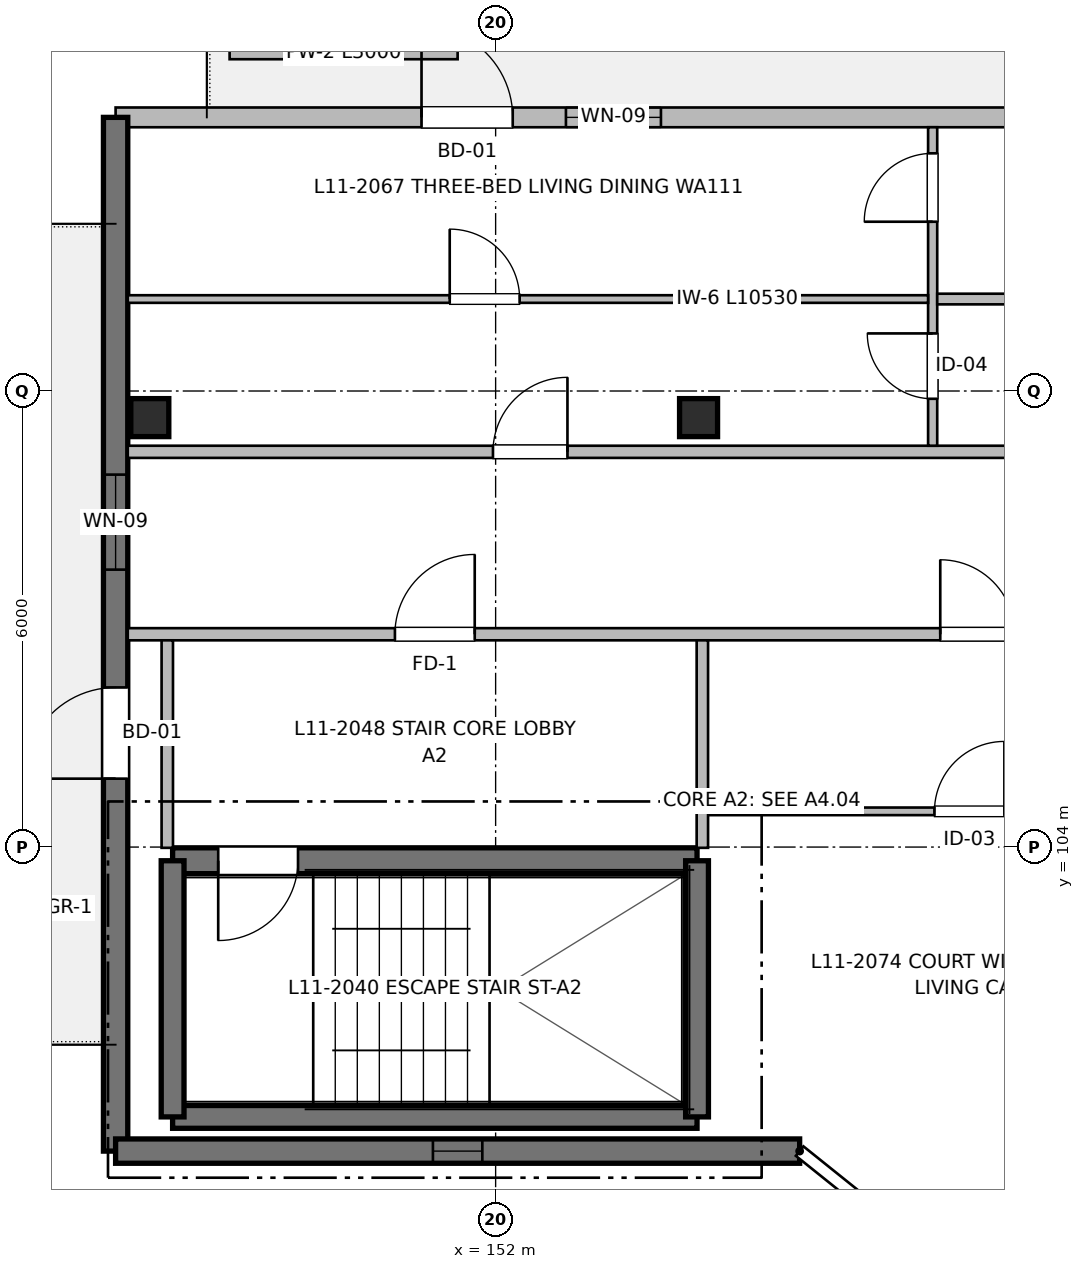
"""IFC4 building model, lengths in metres.
Left out: names, types, materials, properties, quantities, classifications, styles, units other than length and angle.
Written with IfcOpenShell. Run it as: python <this file> out.ifc"""

import sys

from ifc_helpers import new_model, si_unit, direction, frame, frame_2d, origin, origin_2d, place, context, subcontext, project, spatial, rectangle, extrude, element, fill, save


model = new_model("IFC4")
c1 = context("Model", 3, precision=1e-05, world=origin(), true_north=direction((0.0, 1.0)))
c2 = subcontext(c1, "Body", "Model", "MODEL_VIEW")
j1 = project(units=[si_unit("LENGTHUNIT", "METRE"), si_unit("PLANEANGLEUNIT", "RADIAN")], contexts=[c1])
p1 = place(None, origin())
s1 = spatial("IfcSite", under=j1, at=p1, CompositionType="ELEMENT")
p2 = place(p1, origin())
s2 = spatial("IfcBuilding", under=s1, at=p2, CompositionType="ELEMENT")
p3 = place(p2, frame((0.0, 0.0, 36.16)))
s3 = spatial("IfcBuildingStorey", under=s2, at=p3, CompositionType="ELEMENT", Elevation=36.16)
for number, where, z_axis, x_axis in (
    (1, (147.45, 109.65, 0.0), (0.0, 0.0, 1.0), (1.0, 0.0, 0.0)),
    (2, (154.67, 109.65, 0.0), (0.0, 0.0, 1.0), (1.0, 0.0, 0.0)),
):
    element("IfcColumn", number, at=place(p3, frame(where, z_axis=z_axis, x_axis=x_axis)), inside=s3, PredefinedType="COLUMN", context=c2, shape_type="SweptSolid", body=[
        extrude(rectangle(XDim=0.5, YDim=0.5, at=origin_2d()), origin(), (0.0, 0.0, 1.0), 3.2),
    ])
p4 = place(p3, frame((147.75, 100.45, 0.0), z_axis=(0.0, 0.0, 1.0), x_axis=(1.0, 0.0, 0.0)))
e3 = element("IfcWall", 3, at=p4, inside=s3, PredefinedType="SHEAR", context=c2, shape_type="SweptSolid", body=[
    extrude(rectangle(XDim=6.9, YDim=0.3, at=frame_2d((3.45, 0.0))), origin(), (0.0, 0.0, 1.0), 3.2),
])
p5 = place(p3, frame((154.65, 103.82, 0.0), z_axis=(0.0, 0.0, 1.0), x_axis=(-1.0, 0.0, 0.0)))
e4 = element("IfcWall", 4, at=p5, inside=s3, PredefinedType="SHEAR", context=c2, shape_type="SweptSolid", body=[
    extrude(rectangle(XDim=6.9, YDim=0.34, at=frame_2d((3.45, 0.0))), origin(), (0.0, 0.0, 1.0), 3.2),
])
p6 = place(p5, frame((5.25, 0.0, 0.0)))
e5 = element("IfcOpeningElement", 5, at=p6, cuts=e4, PredefinedType="OPENING", context=c2, shape_type="SweptSolid", body=[
    extrude(rectangle(XDim=1.05, YDim=2.15, at=frame_2d((0.525, 1.075))), frame((0.0, 0.18, 0.0), z_axis=(0.0, -1.0, 0.0), x_axis=(1.0, 0.0, 0.0)), (0.0, 0.0, 1.0), 0.36),
])
for number, where, z_axis, x_axis in (
    (6, (147.75, 103.82, 0.0), (0.0, 0.0, 1.0), (0.0, -1.0, 0.0)),
    (7, (154.65, 100.45, 0.0), (0.0, 0.0, 1.0), (0.0, 1.0, 0.0)),
):
    element("IfcWall", number, at=place(p3, frame(where, z_axis=z_axis, x_axis=x_axis)), inside=s3, PredefinedType="SHEAR", context=c2, shape_type="SweptSolid", body=[
        extrude(rectangle(XDim=3.37, YDim=0.3, at=frame_2d((1.685, 0.0))), origin(), (0.0, 0.0, 1.0), 3.2),
    ])
p7 = place(p3, frame((147.0, 113.6, 0.0), z_axis=(0.0, 0.0, 1.0), x_axis=(1.0, 0.0, 0.0)))
e8 = element("IfcWall", 8, at=p7, inside=s3, PredefinedType="SOLIDWALL", context=c2, shape_type="SweptSolid", body=[
    extrude(rectangle(XDim=37.0, YDim=0.26, at=frame_2d((18.5, 0.0))), origin(), (0.0, 0.0, 1.0), 2.98),
])
p8 = place(p7, frame((4.025, 0.0, 0.0)))
e9 = element("IfcOpeningElement", 9, at=p8, cuts=e8, PredefinedType="OPENING", context=c2, shape_type="SweptSolid", body=[
    extrude(rectangle(XDim=1.2, YDim=2.2, at=frame_2d((0.6, 1.1))), frame((0.0, 0.14, 0.0), z_axis=(0.0, -1.0, 0.0), x_axis=(1.0, 0.0, 0.0)), (0.0, 0.0, 1.0), 0.28),
])
p9 = place(p7, frame((5.925, 0.0, 0.87)))
e10 = element("IfcOpeningElement", 10, at=p9, cuts=e8, PredefinedType="OPENING", context=c2, shape_type="SweptSolid", body=[
    extrude(rectangle(XDim=1.25, YDim=1.35, at=frame_2d((0.625, 0.675))), frame((0.0, 0.14, 0.0), z_axis=(0.0, -1.0, 0.0), x_axis=(1.0, 0.0, 0.0)), (0.0, 0.0, 1.0), 0.28),
])
p10 = place(p7, frame((13.325, 0.0, 0.62)))
e11 = element("IfcOpeningElement", 11, at=p10, cuts=e8, PredefinedType="OPENING", context=c2, shape_type="SweptSolid", body=[
    extrude(rectangle(XDim=1.1, YDim=1.6, at=frame_2d((0.55, 0.8))), frame((0.0, 0.14, 0.0), z_axis=(0.0, -1.0, 0.0), x_axis=(1.0, 0.0, 0.0)), (0.0, 0.0, 1.0), 0.28),
])
p11 = place(p7, frame((22.525, 0.0, 0.0)))
e12 = element("IfcOpeningElement", 12, at=p11, cuts=e8, PredefinedType="OPENING", context=c2, shape_type="SweptSolid", body=[
    extrude(rectangle(XDim=1.2, YDim=2.2, at=frame_2d((0.6, 1.1))), frame((0.0, 0.14, 0.0), z_axis=(0.0, -1.0, 0.0), x_axis=(1.0, 0.0, 0.0)), (0.0, 0.0, 1.0), 0.28),
])
p12 = place(p7, frame((24.425, 0.0, 0.67)))
e13 = element("IfcOpeningElement", 13, at=p12, cuts=e8, PredefinedType="OPENING", context=c2, shape_type="SweptSolid", body=[
    extrude(rectangle(XDim=2.1, YDim=1.55, at=frame_2d((1.05, 0.775))), frame((0.0, 0.14, 0.0), z_axis=(0.0, -1.0, 0.0), x_axis=(1.0, 0.0, 0.0)), (0.0, 0.0, 1.0), 0.28),
])
p13 = place(p7, frame((31.525, 0.0, 0.72)))
e14 = element("IfcOpeningElement", 14, at=p13, cuts=e8, PredefinedType="OPENING", context=c2, shape_type="SweptSolid", body=[
    extrude(rectangle(XDim=1.7, YDim=1.5, at=frame_2d((0.85, 0.75))), frame((0.0, 0.14, 0.0), z_axis=(0.0, -1.0, 0.0), x_axis=(1.0, 0.0, 0.0)), (0.0, 0.0, 1.0), 0.28),
])
p14 = place(p3, frame((147.0, 100.0, 0.0), z_axis=(0.0, 0.0, 1.0), x_axis=(0.0, 1.0, 0.0)))
e15 = element("IfcWall", 15, at=p14, inside=s3, PredefinedType="SHEAR", context=c2, shape_type="SweptSolid", body=[
    extrude(rectangle(XDim=13.6, YDim=0.32, at=frame_2d((6.8, 0.0))), origin(), (0.0, 0.0, 1.0), 2.98),
])
p15 = place(p14, frame((4.9, 0.0, 0.0)))
e16 = element("IfcOpeningElement", 16, at=p15, cuts=e15, PredefinedType="OPENING", context=c2, shape_type="SweptSolid", body=[
    extrude(rectangle(XDim=1.2, YDim=2.2, at=frame_2d((0.6, 1.1))), frame((0.0, 0.17, 0.0), z_axis=(0.0, -1.0, 0.0), x_axis=(1.0, 0.0, 0.0)), (0.0, 0.0, 1.0), 0.34),
])
p16 = place(p14, frame((7.65, 0.0, 0.87)))
e17 = element("IfcOpeningElement", 17, at=p16, cuts=e15, PredefinedType="OPENING", context=c2, shape_type="SweptSolid", body=[
    extrude(rectangle(XDim=1.25, YDim=1.35, at=frame_2d((0.625, 0.675))), frame((0.0, 0.17, 0.0), z_axis=(0.0, -1.0, 0.0), x_axis=(1.0, 0.0, 0.0)), (0.0, 0.0, 1.0), 0.34),
])
p17 = place(p3, frame((156.0, 100.0, 0.0), z_axis=(0.0, 0.0, 1.0), x_axis=(-1.0, 0.0, 0.0)))
e18 = element("IfcWall", 18, at=p17, inside=s3, PredefinedType="SHEAR", context=c2, shape_type="SweptSolid", body=[
    extrude(rectangle(XDim=9.0, YDim=0.32, at=frame_2d((4.5, 0.0))), origin(), (0.0, 0.0, 1.0), 2.98),
])
p18 = place(p17, frame((4.175, 0.0, 0.9)))
e19 = element("IfcOpeningElement", 19, at=p18, cuts=e18, PredefinedType="OPENING", context=c2, shape_type="SweptSolid", body=[
    extrude(rectangle(XDim=0.65, YDim=0.95, at=frame_2d((0.325, 0.475))), frame((0.0, 0.17, 0.0), z_axis=(0.0, -1.0, 0.0), x_axis=(1.0, 0.0, 0.0)), (0.0, 0.0, 1.0), 0.34),
])
p19 = place(p3, frame((148.5, 114.45, 0.0), z_axis=(0.0, 0.0, 1.0), x_axis=(1.0, 0.0, 0.0)))
e20 = element("IfcWall", 20, at=p19, inside=s3, PredefinedType="PARAPET", context=c2, shape_type="SweptSolid", body=[
    extrude(rectangle(XDim=3.0, YDim=0.17, at=frame_2d((1.5, 0.0))), origin(), (0.0, 0.0, 1.0), 0.45),
])
p20 = place(p3, frame((147.16, 106.8, 0.0), z_axis=(0.0, 0.0, 1.0), x_axis=(1.0, 0.0, 0.0)))
e21 = element("IfcWall", 21, at=p20, inside=s3, PredefinedType="PARTITIONING", context=c2, shape_type="SweptSolid", body=[
    extrude(rectangle(XDim=27.64, YDim=0.16, at=frame_2d((13.82, 0.0))), origin(), (0.0, 0.0, 1.0), 2.935),
])
p21 = place(p20, frame((3.515, 0.0, 0.0)))
e22 = element("IfcOpeningElement", 22, at=p21, cuts=e21, PredefinedType="OPENING", context=c2, shape_type="SweptSolid", body=[
    extrude(rectangle(XDim=1.05, YDim=2.15, at=frame_2d((0.525, 1.075))), frame((0.0, 0.09, 0.0), z_axis=(0.0, -1.0, 0.0), x_axis=(1.0, 0.0, 0.0)), (0.0, 0.0, 1.0), 0.18),
])
p22 = place(p20, frame((10.69, 0.0, 0.0)))
e23 = element("IfcOpeningElement", 23, at=p22, cuts=e21, PredefinedType="OPENING", context=c2, shape_type="SweptSolid", body=[
    extrude(rectangle(XDim=0.98, YDim=2.15, at=frame_2d((0.49, 1.075))), frame((0.0, 0.09, 0.0), z_axis=(0.0, -1.0, 0.0), x_axis=(1.0, 0.0, 0.0)), (0.0, 0.0, 1.0), 0.18),
])
p23 = place(p3, frame((147.16, 109.2, 0.0), z_axis=(0.0, 0.0, 1.0), x_axis=(1.0, 0.0, 0.0)))
e24 = element("IfcWall", 24, at=p23, inside=s3, PredefinedType="PARTITIONING", context=c2, shape_type="SweptSolid", body=[
    extrude(rectangle(XDim=36.68, YDim=0.16, at=frame_2d((18.34, 0.0))), origin(), (0.0, 0.0, 1.0), 2.935),
])
p24 = place(p23, frame((4.805, 0.0, 0.0)))
e25 = element("IfcOpeningElement", 25, at=p24, cuts=e24, PredefinedType="OPENING", context=c2, shape_type="SweptSolid", body=[
    extrude(rectangle(XDim=0.98, YDim=2.15, at=frame_2d((0.49, 1.075))), frame((0.0, 0.09, 0.0), z_axis=(0.0, -1.0, 0.0), x_axis=(1.0, 0.0, 0.0)), (0.0, 0.0, 1.0), 0.18),
])
p25 = place(p23, frame((23.235, 0.0, 0.0)))
e26 = element("IfcOpeningElement", 26, at=p25, cuts=e24, PredefinedType="OPENING", context=c2, shape_type="SweptSolid", body=[
    extrude(rectangle(XDim=0.98, YDim=2.15, at=frame_2d((0.49, 1.075))), frame((0.0, 0.09, 0.0), z_axis=(0.0, -1.0, 0.0), x_axis=(1.0, 0.0, 0.0)), (0.0, 0.0, 1.0), 0.18),
])
for number, where, z_axis, x_axis in (
    (27, (147.68, 103.99, 0.0), (0.0, 0.0, 1.0), (0.0, 1.0, 0.0)),
    (28, (154.72, 103.99, 0.0), (0.0, 0.0, 1.0), (0.0, 1.0, 0.0)),
):
    element("IfcWall", number, at=place(p3, frame(where, z_axis=z_axis, x_axis=x_axis)), inside=s3, PredefinedType="PARTITIONING", context=c2, shape_type="SweptSolid", body=[
        extrude(rectangle(XDim=2.73, YDim=0.15, at=frame_2d((1.365, 0.0))), origin(), (0.0, 0.0, 1.0), 2.935),
    ])
p26 = place(p3, frame((157.75, 109.28, 0.0), z_axis=(0.0, 0.0, 1.0), x_axis=(0.0, 1.0, 0.0)))
e29 = element("IfcWall", 29, at=p26, inside=s3, PredefinedType="PARTITIONING", context=c2, shape_type="SweptSolid", body=[
    extrude(rectangle(XDim=4.19, YDim=0.12, at=frame_2d((2.095, 0.0))), origin(), (0.0, 0.0, 1.0), 2.935),
])
p27 = place(p26, frame((0.618, 0.0, 0.0)))
e30 = element("IfcOpeningElement", 30, at=p27, cuts=e29, PredefinedType="OPENING", context=c2, shape_type="SweptSolid", body=[
    extrude(rectangle(XDim=0.86, YDim=2.1, at=frame_2d((0.43, 1.05))), frame((0.0, 0.07, 0.0), z_axis=(0.0, -1.0, 0.0), x_axis=(1.0, 0.0, 0.0)), (0.0, 0.0, 1.0), 0.14),
])
p28 = place(p26, frame((2.947, 0.0, 0.0)))
e31 = element("IfcOpeningElement", 31, at=p28, cuts=e29, PredefinedType="OPENING", context=c2, shape_type="SweptSolid", body=[
    extrude(rectangle(XDim=0.9, YDim=2.1, at=frame_2d((0.45, 1.05))), frame((0.0, 0.07, 0.0), z_axis=(0.0, -1.0, 0.0), x_axis=(1.0, 0.0, 0.0)), (0.0, 0.0, 1.0), 0.14),
])
p29 = place(p3, frame((157.81, 111.21, 0.0), z_axis=(0.0, 0.0, 1.0), x_axis=(1.0, 0.0, 0.0)))
e32 = element("IfcWall", 32, at=p29, inside=s3, PredefinedType="PARTITIONING", context=c2, shape_type="SweptSolid", body=[
    extrude(rectangle(XDim=7.6, YDim=0.14, at=frame_2d((3.8, 0.0))), origin(), (0.0, 0.0, 1.0), 2.935),
])
p30 = place(p29, frame((2.264, 0.0, 0.0)))
e33 = element("IfcOpeningElement", 33, at=p30, cuts=e32, PredefinedType="OPENING", context=c2, shape_type="SweptSolid", body=[
    extrude(rectangle(XDim=0.85, YDim=2.05, at=frame_2d((0.425, 1.025))), frame((0.0, 0.08, 0.0), z_axis=(0.0, -1.0, 0.0), x_axis=(1.0, 0.0, 0.0)), (0.0, 0.0, 1.0), 0.16),
])
p31 = place(p3, frame((147.16, 111.21, 0.0), z_axis=(0.0, 0.0, 1.0), x_axis=(1.0, 0.0, 0.0)))
e34 = element("IfcWall", 34, at=p31, inside=s3, PredefinedType="PARTITIONING", context=c2, shape_type="SweptSolid", body=[
    extrude(rectangle(XDim=10.53, YDim=0.1, at=frame_2d((5.265, 0.0))), origin(), (0.0, 0.0, 1.0), 2.935),
])
p32 = place(p31, frame((4.236, 0.0, 0.0)))
e35 = element("IfcOpeningElement", 35, at=p32, cuts=e34, PredefinedType="OPENING", context=c2, shape_type="SweptSolid", body=[
    extrude(rectangle(XDim=0.92, YDim=2.1, at=frame_2d((0.46, 1.05))), frame((0.0, 0.06, 0.0), z_axis=(0.0, -1.0, 0.0), x_axis=(1.0, 0.0, 0.0)), (0.0, 0.0, 1.0), 0.12),
])
p33 = place(p3, frame((154.8, 104.47, 0.0), z_axis=(0.0, 0.0, 1.0), x_axis=(1.0, 0.0, 0.0)))
e36 = element("IfcWall", 36, at=p33, inside=s3, PredefinedType="PARTITIONING", context=c2, shape_type="SweptSolid", body=[
    extrude(rectangle(XDim=7.02, YDim=0.1, at=frame_2d((3.51, 0.0))), origin(), (0.0, 0.0, 1.0), 2.935),
])
p34 = place(p33, frame((2.974, 0.0, 0.0)))
e37 = element("IfcOpeningElement", 37, at=p34, cuts=e36, PredefinedType="OPENING", context=c2, shape_type="SweptSolid", body=[
    extrude(rectangle(XDim=0.92, YDim=2.1, at=frame_2d((0.46, 1.05))), frame((0.0, 0.06, 0.0), z_axis=(0.0, -1.0, 0.0), x_axis=(1.0, 0.0, 0.0)), (0.0, 0.0, 1.0), 0.12),
])
p35 = place(p6, origin())
e38 = element("IfcDoor", 38, at=p35, inside=s3, OperationType="SINGLE_SWING_RIGHT", PredefinedType="DOOR", context=c2, shape_type="SweptSolid", body=[
    extrude(rectangle(XDim=1.05, YDim=2.15, at=frame_2d((0.525, 1.075))), frame((0.0, 0.025, 0.0), z_axis=(0.0, -1.0, 0.0), x_axis=(1.0, 0.0, 0.0)), (0.0, 0.0, 1.0), 0.05),
])
fill(e5, e38)
p36 = place(p8, origin())
e39 = element("IfcDoor", 39, at=p36, inside=s3, OperationType="SINGLE_SWING_LEFT", PredefinedType="DOOR", context=c2, shape_type="SweptSolid", body=[
    extrude(rectangle(XDim=1.2, YDim=2.2, at=frame_2d((0.6, 1.1))), frame((0.0, 0.025, 0.0), z_axis=(0.0, -1.0, 0.0), x_axis=(1.0, 0.0, 0.0)), (0.0, 0.0, 1.0), 0.05),
])
fill(e9, e39)
p37 = place(p9, origin())
e40 = element("IfcWindow", 40, at=p37, inside=s3, PartitioningType="SINGLE_PANEL", PredefinedType="WINDOW", context=c2, shape_type="SweptSolid", body=[
    extrude(rectangle(XDim=1.25, YDim=1.35, at=frame_2d((0.625, 0.675))), frame((0.0, 0.03, 0.0), z_axis=(0.0, -1.0, 0.0), x_axis=(1.0, 0.0, 0.0)), (0.0, 0.0, 1.0), 0.06),
])
fill(e10, e40)
p38 = place(p15, origin())
e41 = element("IfcDoor", 41, at=p38, inside=s3, OperationType="SINGLE_SWING_LEFT", PredefinedType="DOOR", context=c2, shape_type="SweptSolid", body=[
    extrude(rectangle(XDim=1.2, YDim=2.2, at=frame_2d((0.6, 1.1))), frame((0.0, 0.025, 0.0), z_axis=(0.0, -1.0, 0.0), x_axis=(1.0, 0.0, 0.0)), (0.0, 0.0, 1.0), 0.05),
])
fill(e16, e41)
p39 = place(p16, origin())
e42 = element("IfcWindow", 42, at=p39, inside=s3, PartitioningType="SINGLE_PANEL", PredefinedType="WINDOW", context=c2, shape_type="SweptSolid", body=[
    extrude(rectangle(XDim=1.25, YDim=1.35, at=frame_2d((0.625, 0.675))), frame((0.0, 0.03, 0.0), z_axis=(0.0, -1.0, 0.0), x_axis=(1.0, 0.0, 0.0)), (0.0, 0.0, 1.0), 0.06),
])
fill(e17, e42)
p40 = place(p18, origin())
e43 = element("IfcWindow", 43, at=p40, inside=s3, PartitioningType="SINGLE_PANEL", PredefinedType="WINDOW", context=c2, shape_type="SweptSolid", body=[
    extrude(rectangle(XDim=0.65, YDim=0.95, at=frame_2d((0.325, 0.475))), frame((0.0, 0.03, 0.0), z_axis=(0.0, -1.0, 0.0), x_axis=(1.0, 0.0, 0.0)), (0.0, 0.0, 1.0), 0.06),
])
fill(e19, e43)
p41 = place(p21, origin())
e44 = element("IfcDoor", 44, at=p41, inside=s3, OperationType="SINGLE_SWING_RIGHT", PredefinedType="DOOR", context=c2, shape_type="SweptSolid", body=[
    extrude(rectangle(XDim=1.05, YDim=2.15, at=frame_2d((0.525, 1.075))), frame((0.0, 0.025, 0.0), z_axis=(0.0, -1.0, 0.0), x_axis=(1.0, 0.0, 0.0)), (0.0, 0.0, 1.0), 0.05),
])
fill(e22, e44)
p42 = place(p24, origin())
e45 = element("IfcDoor", 45, at=p42, inside=s3, OperationType="SINGLE_SWING_RIGHT", PredefinedType="DOOR", context=c2, shape_type="SweptSolid", body=[
    extrude(rectangle(XDim=0.98, YDim=2.15, at=frame_2d((0.49, 1.075))), frame((0.0, 0.025, 0.0), z_axis=(0.0, -1.0, 0.0), x_axis=(1.0, 0.0, 0.0)), (0.0, 0.0, 1.0), 0.05),
])
fill(e25, e45)
p43 = place(p32, origin())
e46 = element("IfcDoor", 46, at=p43, inside=s3, OperationType="SINGLE_SWING_LEFT", PredefinedType="DOOR", context=c2, shape_type="SweptSolid", body=[
    extrude(rectangle(XDim=0.92, YDim=2.1, at=frame_2d((0.46, 1.05))), frame((0.0, 0.025, 0.0), z_axis=(0.0, -1.0, 0.0), x_axis=(1.0, 0.0, 0.0)), (0.0, 0.0, 1.0), 0.05),
])
fill(e35, e46)
p44 = place(p27, origin())
e47 = element("IfcDoor", 47, at=p44, inside=s3, OperationType="SINGLE_SWING_RIGHT", PredefinedType="DOOR", context=c2, shape_type="SweptSolid", body=[
    extrude(rectangle(XDim=0.86, YDim=2.1, at=frame_2d((0.43, 1.05))), frame((0.0, 0.025, 0.0), z_axis=(0.0, -1.0, 0.0), x_axis=(1.0, 0.0, 0.0)), (0.0, 0.0, 1.0), 0.05),
])
fill(e30, e47)
p45 = place(p28, origin())
e48 = element("IfcDoor", 48, at=p45, inside=s3, OperationType="SINGLE_SWING_LEFT", PredefinedType="DOOR", context=c2, shape_type="SweptSolid", body=[
    extrude(rectangle(XDim=0.9, YDim=2.1, at=frame_2d((0.45, 1.05))), frame((0.0, 0.025, 0.0), z_axis=(0.0, -1.0, 0.0), x_axis=(1.0, 0.0, 0.0)), (0.0, 0.0, 1.0), 0.05),
])
fill(e31, e48)
p46 = place(p22, origin())
e49 = element("IfcDoor", 49, at=p46, inside=s3, OperationType="SINGLE_SWING_LEFT", PredefinedType="DOOR", context=c2, shape_type="SweptSolid", body=[
    extrude(rectangle(XDim=0.98, YDim=2.15, at=frame_2d((0.49, 1.075))), frame((0.0, 0.025, 0.0), z_axis=(0.0, -1.0, 0.0), x_axis=(1.0, 0.0, 0.0)), (0.0, 0.0, 1.0), 0.05),
])
fill(e23, e49)
p47 = place(p34, origin())
e50 = element("IfcDoor", 50, at=p47, inside=s3, OperationType="SINGLE_SWING_RIGHT", PredefinedType="DOOR", context=c2, shape_type="SweptSolid", body=[
    extrude(rectangle(XDim=0.92, YDim=2.1, at=frame_2d((0.46, 1.05))), frame((0.0, 0.025, 0.0), z_axis=(0.0, -1.0, 0.0), x_axis=(1.0, 0.0, 0.0)), (0.0, 0.0, 1.0), 0.05),
])
fill(e37, e50)
save(model, sys.argv[1])
